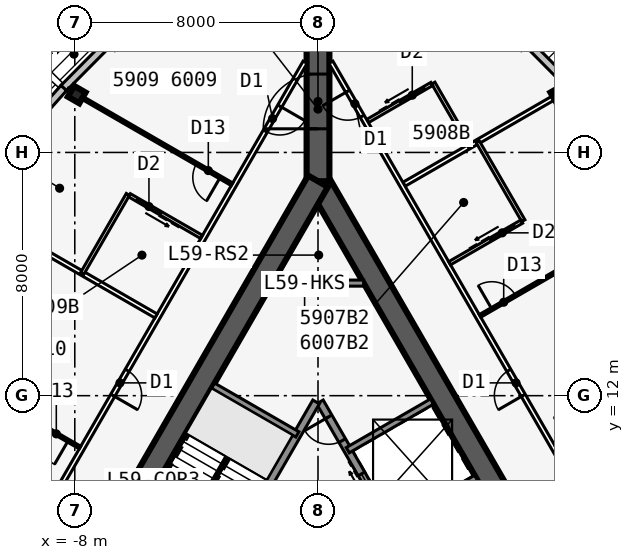
"""IFC4 building model, lengths in metres.
Left out: names, types, materials, properties, quantities, classifications, styles, units other than length and angle.
Written with IfcOpenShell. Run it as: python <this file> out.ifc"""

import sys

from ifc_helpers import new_model, si_unit, direction, frame, frame_2d, origin, origin_2d, place, context, subcontext, project, spatial, rectangle, i_section, extrude, element, fill, save


model = new_model("IFC4")
c1 = context("Model", 3, precision=1e-05, world=origin(), true_north=direction((0.0, 1.0)))
c2 = subcontext(c1, "Body", "Model", "MODEL_VIEW")
j1 = project(units=[si_unit("LENGTHUNIT", "METRE"), si_unit("PLANEANGLEUNIT", "RADIAN")], contexts=[c1])
p1 = place(None, origin())
s1 = spatial("IfcSite", under=j1, at=p1, CompositionType="ELEMENT")
p2 = place(p1, origin())
s2 = spatial("IfcBuilding", under=s1, at=p2, CompositionType="ELEMENT")
p3 = place(p2, frame((0.0, 0.0, 222.5)))
s3 = spatial("IfcBuildingStorey", under=s2, at=p3, CompositionType="ELEMENT", Elevation=222.5)
p4 = place(p3, frame((16.5, -9.526, 0.0), z_axis=(0.0, 0.0, 1.0), x_axis=(-0.499999749417, 0.866025548458, 0.0)))
e1 = element("IfcWall", 1, at=p4, inside=s3, PredefinedType="SHEAR", context=c2, shape_type="SweptSolid", body=[
    extrude(rectangle(XDim=33.0, YDim=0.75, at=frame_2d((16.5, 0.0))), origin(), (0.0, 0.0, 1.0), 3.6),
])
p5 = place(p4, frame((14.15, 0.0, 0.0)))
e2 = element("IfcOpeningElement", 2, at=p5, cuts=e1, PredefinedType="OPENING", context=c2, shape_type="SweptSolid", body=[
    extrude(rectangle(XDim=1.8, YDim=2.13, at=frame_2d((0.9, 1.065))), frame((0.0, 0.385, 0.0), z_axis=(0.0, -1.0, 0.0), x_axis=(1.0, 0.0, 0.0)), (0.0, 0.0, 1.0), 0.77),
])
p6 = place(p4, frame((12.6, 0.0, 0.0)))
e3 = element("IfcOpeningElement", 3, at=p6, cuts=e1, PredefinedType="OPENING", context=c2, shape_type="SweptSolid", body=[
    extrude(rectangle(XDim=1.0, YDim=2.13, at=frame_2d((0.5, 1.065))), frame((0.0, 0.385, 0.0), z_axis=(0.0, -1.0, 0.0), x_axis=(1.0, 0.0, 0.0)), (0.0, 0.0, 1.0), 0.77),
])
p7 = place(p3, frame((5.379, 2.586, 0.0), z_axis=(0.0, 0.0, 1.0), x_axis=(-0.500001375892, 0.866024609411, 0.0)))
e4 = element("IfcWall", 4, at=p7, inside=s3, PredefinedType="SOLIDWALL", context=c2, shape_type="SweptSolid", body=[
    extrude(rectangle(XDim=10.633, YDim=0.25, at=frame_2d((5.316, 0.0))), origin(), (0.0, 0.0, 1.0), 3.435),
])
p8 = place(p7, frame((9.164, 0.0, 0.0)))
e5 = element("IfcOpeningElement", 5, at=p8, cuts=e4, PredefinedType="OPENING", context=c2, shape_type="SweptSolid", body=[
    extrude(rectangle(XDim=0.9, YDim=2.13, at=frame_2d((0.45, 1.065))), frame((0.0, 0.135, 0.0), z_axis=(0.0, -1.0, 0.0), x_axis=(1.0, 0.0, 0.0)), (0.0, 0.0, 1.0), 0.27),
])
p9 = place(p7, frame((1.0, 0.0, 0.0)))
e6 = element("IfcOpeningElement", 6, at=p9, cuts=e4, PredefinedType="OPENING", context=c2, shape_type="SweptSolid", body=[
    extrude(rectangle(XDim=1.1, YDim=2.13, at=frame_2d((0.55, 1.065))), frame((0.0, 0.135, 0.0), z_axis=(0.0, -1.0, 0.0), x_axis=(1.0, 0.0, 0.0)), (0.0, 0.0, 1.0), 0.27),
])
p10 = place(p7, frame((3.9, 0.0, 0.0)))
e7 = element("IfcOpeningElement", 7, at=p10, cuts=e4, PredefinedType="OPENING", context=c2, shape_type="SweptSolid", body=[
    extrude(rectangle(XDim=1.1, YDim=2.13, at=frame_2d((0.55, 1.065))), frame((0.0, 0.135, 0.0), z_axis=(0.0, -1.0, 0.0), x_axis=(1.0, 0.0, 0.0)), (0.0, 0.0, 1.0), 0.27),
])
p11 = place(p7, frame((6.8, 0.0, 0.0)))
e8 = element("IfcOpeningElement", 8, at=p11, cuts=e4, PredefinedType="OPENING", context=c2, shape_type="SweptSolid", body=[
    extrude(rectangle(XDim=1.1, YDim=2.13, at=frame_2d((0.55, 1.065))), frame((0.0, 0.135, 0.0), z_axis=(0.0, -1.0, 0.0), x_axis=(1.0, 0.0, 0.0)), (0.0, 0.0, 1.0), 0.27),
])
for number, where, z_axis, x_axis in (
    (9, (2.429, 7.696, 0.0), (0.0, 0.0, 1.0), (0.866, 0.5, 0.0)),
    (10, (0.979, 10.207, 0.0), (0.0, 0.0, 1.0), (0.866, 0.5, 0.0)),
):
    element("IfcWall", number, at=place(p3, frame(where, z_axis=z_axis, x_axis=x_axis)), inside=s3, PredefinedType="SOLIDWALL", context=c2, shape_type="SweptSolid", body=[
        extrude(rectangle(XDim=3.2, YDim=0.2, at=frame_2d((1.6, 0.0))), origin(), (0.0, 0.0, 1.0), 3.435),
    ])
p12 = place(p3, frame((0.0, 19.052, 0.0), z_axis=(0.0, 0.0, 1.0), x_axis=(-0.499999749417, -0.866025548458, 0.0)))
e11 = element("IfcWall", 11, at=p12, inside=s3, PredefinedType="SHEAR", context=c2, shape_type="SweptSolid", body=[
    extrude(rectangle(XDim=33.0, YDim=0.75, at=frame_2d((16.5, 0.0))), origin(), (0.0, 0.0, 1.0), 3.6),
])
p13 = place(p12, frame((14.15, 0.0, 0.0)))
e12 = element("IfcOpeningElement", 12, at=p13, cuts=e11, PredefinedType="OPENING", context=c2, shape_type="SweptSolid", body=[
    extrude(rectangle(XDim=1.8, YDim=2.13, at=frame_2d((0.9, 1.065))), frame((0.0, 0.385, 0.0), z_axis=(0.0, -1.0, 0.0), x_axis=(1.0, 0.0, 0.0)), (0.0, 0.0, 1.0), 0.77),
])
p14 = place(p12, frame((12.6, 0.0, 0.0)))
e13 = element("IfcOpeningElement", 13, at=p14, cuts=e11, PredefinedType="OPENING", context=c2, shape_type="SweptSolid", body=[
    extrude(rectangle(XDim=1.0, YDim=2.13, at=frame_2d((0.5, 1.065))), frame((0.0, 0.385, 0.0), z_axis=(0.0, -1.0, 0.0), x_axis=(1.0, 0.0, 0.0)), (0.0, 0.0, 1.0), 0.77),
])
p15 = place(p3, frame((-0.062, 11.794, 0.0), z_axis=(0.0, 0.0, 1.0), x_axis=(-0.500006680225, -0.86602154692, 0.0)))
e14 = element("IfcWall", 14, at=p15, inside=s3, PredefinedType="SOLIDWALL", context=c2, shape_type="SweptSolid", body=[
    extrude(rectangle(XDim=7.733, YDim=0.25, at=frame_2d((3.866, 0.0))), origin(), (0.0, 0.0, 1.0), 3.435),
])
p16 = place(p3, frame((-0.679, 10.727, 0.0), z_axis=(0.0, 0.0, 1.0), x_axis=(-0.866008981251, 0.500028443584, 0.0)))
e15 = element("IfcWall", 15, at=p16, inside=s3, PredefinedType="SOLIDWALL", context=c2, shape_type="SweptSolid", body=[
    extrude(rectangle(XDim=3.2, YDim=0.2, at=frame_2d((1.6, 0.0))), origin(), (0.0, 0.0, 1.0), 3.435),
])
p17 = place(p3, frame((0.0, 19.052, 0.0), z_axis=(0.0, 0.0, 1.0), x_axis=(0.0, 1.0, 0.0)))
e16 = element("IfcWall", 16, at=p17, inside=s3, PredefinedType="SHEAR", context=c2, shape_type="SweptSolid", body=[
    extrude(rectangle(XDim=4.746, YDim=0.75, at=frame_2d((2.373, 0.0))), origin(), (0.0, 0.0, 1.0), 3.6),
])
p18 = place(p17, frame((1.725, 0.0, 0.0)))
e17 = element("IfcOpeningElement", 17, at=p18, cuts=e16, PredefinedType="OPENING", context=c2, shape_type="SweptSolid", body=[
    extrude(rectangle(XDim=1.8, YDim=2.13, at=frame_2d((0.9, 1.065))), frame((0.0, 0.385, 0.0), z_axis=(0.0, -1.0, 0.0), x_axis=(1.0, 0.0, 0.0)), (0.0, 0.0, 1.0), 0.77),
])
for number, where, z_axis, x_axis in (
    (18, (7.937, 21.903, 0.0), (0.0, 0.0, 1.0), (-0.5, 0.866, 0.0)),
    (19, (-7.937, 21.903, 0.0), (0.0, 0.0, 1.0), (-0.5, -0.866, 0.0)),
):
    element("IfcColumn", number, at=place(p3, frame(where, z_axis=z_axis, x_axis=x_axis)), inside=s3, PredefinedType="COLUMN", context=c2, shape_type="SweptSolid", body=[
        extrude(i_section(OverallWidth=0.411, OverallDepth=0.434, WebThickness=0.036, FlangeThickness=0.057, at=origin_2d()), origin(), (0.0, 0.0, 1.0), 3.6),
    ])
for number, where, z_axis, x_axis in (
    (20, (8.368, 22.115, 0.0), (0.0, 0.0, 1.0), (-0.704, 0.71, 0.0)),
    (21, (-6.911, 23.583, 0.0), (0.0, 0.0, 1.0), (-0.704, -0.71, 0.0)),
):
    element("IfcWall", number, at=place(p3, frame(where, z_axis=z_axis, x_axis=x_axis)), inside=s3, PredefinedType="STANDARD", context=c2, shape_type="SweptSolid", body=[
        extrude(rectangle(XDim=2.069, YDim=0.25, at=frame_2d((1.034, 0.0))), origin(), (0.0, 0.0, 1.0), 3.435),
    ])
p19 = place(p3, frame((-8.363, 22.12, 0.0), z_axis=(0.0, 0.0, 1.0), x_axis=(-0.664348996191, -0.747422511876, 0.0)))
e22 = element("IfcWall", 22, at=p19, inside=s3, PredefinedType="STANDARD", context=c2, shape_type="SweptSolid", body=[
    extrude(rectangle(XDim=5.105, YDim=0.25, at=frame_2d((2.552, 0.0))), origin(), (0.0, 0.0, 1.0), 3.435),
])
p20 = place(p19, frame((0.752, 0.0, 0.45)))
e23 = element("IfcOpeningElement", 23, at=p20, cuts=e22, PredefinedType="OPENING", context=c2, shape_type="SweptSolid", body=[
    extrude(rectangle(XDim=3.6, YDim=2.6, at=frame_2d((1.8, 1.3))), frame((0.0, 0.135, 0.0), z_axis=(0.0, -1.0, 0.0), x_axis=(1.0, 0.0, 0.0)), (0.0, 0.0, 1.0), 0.27),
])
p21 = place(p3, frame((20.102, -11.115, 0.0), z_axis=(0.0, 0.0, 1.0), x_axis=(-0.500000265775, 0.866025250339, 0.0)))
e24 = element("IfcWall", 24, at=p21, inside=s3, PredefinedType="PARTITIONING", context=c2, shape_type="SweptSolid", body=[
    extrude(rectangle(XDim=39.354, YDim=0.15, at=frame_2d((19.677, 0.0))), origin(), (0.0, 0.0, 1.0), 3.435),
])
p22 = place(p21, frame((1.102, 0.0, 0.0)))
e25 = element("IfcOpeningElement", 25, at=p22, cuts=e24, PredefinedType="OPENING", context=c2, shape_type="SweptSolid", body=[
    extrude(rectangle(XDim=0.95, YDim=2.13, at=frame_2d((0.475, 1.065))), frame((0.0, 0.085, 0.0), z_axis=(0.0, -1.0, 0.0), x_axis=(1.0, 0.0, 0.0)), (0.0, 0.0, 1.0), 0.17),
])
p23 = place(p21, frame((11.702, 0.0, 0.0)))
e26 = element("IfcOpeningElement", 26, at=p23, cuts=e24, PredefinedType="OPENING", context=c2, shape_type="SweptSolid", body=[
    extrude(rectangle(XDim=0.95, YDim=2.13, at=frame_2d((0.475, 1.065))), frame((0.0, 0.085, 0.0), z_axis=(0.0, -1.0, 0.0), x_axis=(1.0, 0.0, 0.0)), (0.0, 0.0, 1.0), 0.17),
])
p24 = place(p21, frame((26.702, 0.0, 0.0)))
e27 = element("IfcOpeningElement", 27, at=p24, cuts=e24, PredefinedType="OPENING", context=c2, shape_type="SweptSolid", body=[
    extrude(rectangle(XDim=0.95, YDim=2.13, at=frame_2d((0.475, 1.065))), frame((0.0, 0.085, 0.0), z_axis=(0.0, -1.0, 0.0), x_axis=(1.0, 0.0, 0.0)), (0.0, 0.0, 1.0), 0.17),
])
p25 = place(p21, frame((37.302, 0.0, 0.0)))
e28 = element("IfcOpeningElement", 28, at=p25, cuts=e24, PredefinedType="OPENING", context=c2, shape_type="SweptSolid", body=[
    extrude(rectangle(XDim=0.95, YDim=2.13, at=frame_2d((0.475, 1.065))), frame((0.0, 0.085, 0.0), z_axis=(0.0, -1.0, 0.0), x_axis=(1.0, 0.0, 0.0)), (0.0, 0.0, 1.0), 0.17),
])
p26 = place(p3, frame((5.329, 14.623, 0.0), z_axis=(0.0, 0.0, 1.0), x_axis=(0.866017877653, 0.500013035415, 0.0)))
e29 = element("IfcWall", 29, at=p26, inside=s3, PredefinedType="PARTITIONING", context=c2, shape_type="SweptSolid", body=[
    extrude(rectangle(XDim=7.273, YDim=0.1, at=frame_2d((3.636, 0.0))), origin(), (0.0, 0.0, 1.0), 2.589),
])
p27 = place(p26, frame((0.45, 0.0, 0.0)))
e30 = element("IfcOpeningElement", 30, at=p27, cuts=e29, PredefinedType="OPENING", context=c2, shape_type="SweptSolid", body=[
    extrude(rectangle(XDim=0.9, YDim=2.13, at=frame_2d((0.45, 1.065))), frame((0.0, 0.06, 0.0), z_axis=(0.0, -1.0, 0.0), x_axis=(1.0, 0.0, 0.0)), (0.0, 0.0, 1.0), 0.12),
])
p28 = place(p3, frame((2.829, 18.954, 0.0), z_axis=(0.0, 0.0, 1.0), x_axis=(0.866026604282, 0.499997920671, 0.0)))
e31 = element("IfcWall", 31, at=p28, inside=s3, PredefinedType="PARTITIONING", context=c2, shape_type="SweptSolid", body=[
    extrude(rectangle(XDim=6.24, YDim=0.15, at=frame_2d((3.12, 0.0))), origin(), (0.0, 0.0, 1.0), 2.589),
])
p29 = place(p3, frame((6.753, 17.755, 0.0), z_axis=(0.0, 0.0, 1.0), x_axis=(-0.499990139034, 0.866031096941, 0.0)))
e32 = element("IfcWall", 32, at=p29, inside=s3, PredefinedType="PLUMBINGWALL", context=c2, shape_type="SweptSolid", body=[
    extrude(rectangle(XDim=3.0, YDim=0.12, at=frame_2d((1.5, 0.0))), origin(), (0.0, 0.0, 1.0), 3.435),
])
p30 = place(p3, frame((4.329, 16.355, 0.0), z_axis=(0.0, 0.0, 1.0), x_axis=(0.866035715982, 0.499982138324, 0.0)))
e33 = element("IfcWall", 33, at=p30, inside=s3, PredefinedType="PLUMBINGWALL", context=c2, shape_type="SweptSolid", body=[
    extrude(rectangle(XDim=2.74, YDim=0.12, at=frame_2d((1.37, 0.0))), origin(), (0.0, 0.0, 1.0), 3.435),
])
p31 = place(p30, frame((1.55, 0.0, 0.0)))
e34 = element("IfcOpeningElement", 34, at=p31, cuts=e33, PredefinedType="OPENING", context=c2, shape_type="SweptSolid", body=[
    extrude(rectangle(XDim=0.9, YDim=2.13, at=frame_2d((0.45, 1.065))), frame((0.0, 0.07, 0.0), z_axis=(0.0, -1.0, 0.0), x_axis=(1.0, 0.0, 0.0)), (0.0, 0.0, 1.0), 0.14),
])
p32 = place(p3, frame((4.993, 20.204, 0.0), z_axis=(0.0, 0.0, 1.0), x_axis=(-0.500001309137, 0.866024647952, 0.0)))
e35 = element("IfcWall", 35, at=p32, inside=s3, PredefinedType="PLUMBINGWALL", context=c2, shape_type="SweptSolid", body=[
    extrude(rectangle(XDim=2.4, YDim=0.12, at=frame_2d((1.2, 0.0))), origin(), (0.0, 0.0, 1.0), 3.435),
])
p33 = place(p3, frame((1.628, 21.032, 0.0), z_axis=(0.0, 0.0, 1.0), x_axis=(0.866048967903, 0.499959183527, 0.0)))
e36 = element("IfcWall", 36, at=p33, inside=s3, PredefinedType="PLUMBINGWALL", context=c2, shape_type="SweptSolid", body=[
    extrude(rectangle(XDim=2.44, YDim=0.12, at=frame_2d((1.22, 0.0))), origin(), (0.0, 0.0, 1.0), 3.435),
])
p34 = place(p33, frame((1.25, 0.0, 0.0)))
e37 = element("IfcOpeningElement", 37, at=p34, cuts=e36, PredefinedType="OPENING", context=c2, shape_type="SweptSolid", body=[
    extrude(rectangle(XDim=0.9, YDim=2.13, at=frame_2d((0.45, 1.065))), frame((0.0, 0.07, 0.0), z_axis=(0.0, -1.0, 0.0), x_axis=(1.0, 0.0, 0.0)), (0.0, 0.0, 1.0), 0.14),
])
p35 = place(p3, frame((-0.425, 22.966, 0.0), z_axis=(0.0, 0.0, 1.0), x_axis=(-0.500000265775, -0.866025250339, 0.0)))
e38 = element("IfcWall", 38, at=p35, inside=s3, PredefinedType="PARTITIONING", context=c2, shape_type="SweptSolid", body=[
    extrude(rectangle(XDim=39.354, YDim=0.15, at=frame_2d((19.677, 0.0))), origin(), (0.0, 0.0, 1.0), 3.435),
])
p36 = place(p35, frame((1.665, 0.0, 0.0)))
e39 = element("IfcOpeningElement", 39, at=p36, cuts=e38, PredefinedType="OPENING", context=c2, shape_type="SweptSolid", body=[
    extrude(rectangle(XDim=0.95, YDim=2.13, at=frame_2d((0.475, 1.065))), frame((0.0, 0.085, 0.0), z_axis=(0.0, -1.0, 0.0), x_axis=(1.0, 0.0, 0.0)), (0.0, 0.0, 1.0), 0.17),
])
p37 = place(p35, frame((11.702, 0.0, 0.0)))
e40 = element("IfcOpeningElement", 40, at=p37, cuts=e38, PredefinedType="OPENING", context=c2, shape_type="SweptSolid", body=[
    extrude(rectangle(XDim=0.95, YDim=2.13, at=frame_2d((0.475, 1.065))), frame((0.0, 0.085, 0.0), z_axis=(0.0, -1.0, 0.0), x_axis=(1.0, 0.0, 0.0)), (0.0, 0.0, 1.0), 0.17),
])
p38 = place(p35, frame((21.702, 0.0, 0.0)))
e41 = element("IfcOpeningElement", 41, at=p38, cuts=e38, PredefinedType="OPENING", context=c2, shape_type="SweptSolid", body=[
    extrude(rectangle(XDim=0.95, YDim=2.13, at=frame_2d((0.475, 1.065))), frame((0.0, 0.085, 0.0), z_axis=(0.0, -1.0, 0.0), x_axis=(1.0, 0.0, 0.0)), (0.0, 0.0, 1.0), 0.17),
])
p39 = place(p35, frame((36.739, 0.0, 0.0)))
e42 = element("IfcOpeningElement", 42, at=p39, cuts=e38, PredefinedType="OPENING", context=c2, shape_type="SweptSolid", body=[
    extrude(rectangle(XDim=0.95, YDim=2.13, at=frame_2d((0.475, 1.065))), frame((0.0, 0.085, 0.0), z_axis=(0.0, -1.0, 0.0), x_axis=(1.0, 0.0, 0.0)), (0.0, 0.0, 1.0), 0.17),
])
p40 = place(p3, frame((-2.829, 18.954, 0.0), z_axis=(0.0, 0.0, 1.0), x_axis=(-0.866026604282, 0.499997920671, 0.0)))
e43 = element("IfcWall", 43, at=p40, inside=s3, PredefinedType="PARTITIONING", context=c2, shape_type="SweptSolid", body=[
    extrude(rectangle(XDim=6.24, YDim=0.1, at=frame_2d((3.12, 0.0))), origin(), (0.0, 0.0, 1.0), 2.589),
])
p41 = place(p40, frame((0.45, 0.0, 0.0)))
e44 = element("IfcOpeningElement", 44, at=p41, cuts=e43, PredefinedType="OPENING", context=c2, shape_type="SweptSolid", body=[
    extrude(rectangle(XDim=0.9, YDim=2.13, at=frame_2d((0.45, 1.065))), frame((0.0, 0.06, 0.0), z_axis=(0.0, -1.0, 0.0), x_axis=(1.0, 0.0, 0.0)), (0.0, 0.0, 1.0), 0.12),
])
p42 = place(p3, frame((-5.329, 14.623, 0.0), z_axis=(0.0, 0.0, 1.0), x_axis=(-0.866017877653, 0.500013035415, 0.0)))
e45 = element("IfcWall", 45, at=p42, inside=s3, PredefinedType="PARTITIONING", context=c2, shape_type="SweptSolid", body=[
    extrude(rectangle(XDim=7.273, YDim=0.15, at=frame_2d((3.636, 0.0))), origin(), (0.0, 0.0, 1.0), 2.589),
])
p43 = place(p3, frame((-7.829, 10.293, 0.0), z_axis=(0.0, 0.0, 1.0), x_axis=(-0.866030558329, 0.49999107196, 0.0)))
e46 = element("IfcWall", 46, at=p43, inside=s3, PredefinedType="PARTITIONING", context=c2, shape_type="SweptSolid", body=[
    extrude(rectangle(XDim=7.894, YDim=0.1, at=frame_2d((3.947, 0.0))), origin(), (0.0, 0.0, 1.0), 2.589),
])
p44 = place(p43, frame((0.45, 0.0, 0.0)))
e47 = element("IfcOpeningElement", 47, at=p44, cuts=e46, PredefinedType="OPENING", context=c2, shape_type="SweptSolid", body=[
    extrude(rectangle(XDim=0.9, YDim=2.13, at=frame_2d((0.45, 1.065))), frame((0.0, 0.06, 0.0), z_axis=(0.0, -1.0, 0.0), x_axis=(1.0, 0.0, 0.0)), (0.0, 0.0, 1.0), 0.12),
])
p45 = place(p3, frame((-6.253, 18.622, 0.0), z_axis=(0.0, 0.0, 1.0), x_axis=(-0.499990139034, -0.866031096941, 0.0)))
e48 = element("IfcWall", 48, at=p45, inside=s3, PredefinedType="PLUMBINGWALL", context=c2, shape_type="SweptSolid", body=[
    extrude(rectangle(XDim=3.0, YDim=0.12, at=frame_2d((1.5, 0.0))), origin(), (0.0, 0.0, 1.0), 3.435),
])
p46 = place(p3, frame((-3.829, 17.221, 0.0), z_axis=(0.0, 0.0, 1.0), x_axis=(-0.865997131366, 0.500048966069, 0.0)))
e49 = element("IfcWall", 49, at=p46, inside=s3, PredefinedType="PLUMBINGWALL", context=c2, shape_type="SweptSolid", body=[
    extrude(rectangle(XDim=2.74, YDim=0.12, at=frame_2d((1.37, 0.0))), origin(), (0.0, 0.0, 1.0), 3.435),
])
p47 = place(p46, frame((1.55, 0.0, 0.0)))
e50 = element("IfcOpeningElement", 50, at=p47, cuts=e49, PredefinedType="OPENING", context=c2, shape_type="SweptSolid", body=[
    extrude(rectangle(XDim=0.9, YDim=2.13, at=frame_2d((0.45, 1.065))), frame((0.0, 0.07, 0.0), z_axis=(0.0, -1.0, 0.0), x_axis=(1.0, 0.0, 0.0)), (0.0, 0.0, 1.0), 0.14),
])
p48 = place(p3, frame((-1.501, 15.703, 0.0), z_axis=(0.0, 0.0, 1.0), x_axis=(1.0, 0.0, 0.0)))
e51 = element("IfcWall", 51, at=p48, inside=s3, PredefinedType="SOLIDWALL", context=c2, shape_type="SweptSolid", body=[
    extrude(rectangle(XDim=3.002, YDim=0.2, at=frame_2d((1.501, 0.0))), origin(), (0.0, 0.0, 1.0), 3.435),
])
p49 = place(p3, frame((-2.988, 9.978, 0.0), z_axis=(0.0, 0.0, 1.0), x_axis=(-0.499992232847, -0.866029888106, 0.0)))
e52 = element("IfcWall", 52, at=p49, inside=s3, PredefinedType="SOLIDWALL", context=c2, shape_type="SweptSolid", body=[
    extrude(rectangle(XDim=2.794, YDim=0.1, at=frame_2d((1.397, 0.0))), origin(), (0.0, 0.0, 1.0), 3.6),
])
p50 = place(p27, origin())
e53 = element("IfcDoor", 53, at=p50, inside=s3, OperationType="SINGLE_SWING_LEFT", PredefinedType="DOOR", context=c2, shape_type="SweptSolid", body=[
    extrude(rectangle(XDim=0.9, YDim=2.13, at=frame_2d((0.45, 1.065))), frame((0.0, 0.025, 0.0), z_axis=(0.0, -1.0, 0.0), x_axis=(1.0, 0.0, 0.0)), (0.0, 0.0, 1.0), 0.05),
])
fill(e30, e53)
p51 = place(p24, origin())
e54 = element("IfcDoor", 54, at=p51, inside=s3, OperationType="SINGLE_SWING_LEFT", PredefinedType="DOOR", context=c2, shape_type="SweptSolid", body=[
    extrude(rectangle(XDim=0.95, YDim=2.13, at=frame_2d((0.475, 1.065))), frame((0.0, 0.025, 0.0), z_axis=(0.0, -1.0, 0.0), x_axis=(1.0, 0.0, 0.0)), (0.0, 0.0, 1.0), 0.05),
])
fill(e27, e54)
p52 = place(p31, origin())
e55 = element("IfcDoor", 55, at=p52, inside=s3, OperationType="SLIDING_TO_LEFT", PredefinedType="DOOR", context=c2, shape_type="SweptSolid", body=[
    extrude(rectangle(XDim=0.9, YDim=2.13, at=frame_2d((0.45, 1.065))), frame((0.0, 0.025, 0.0), z_axis=(0.0, -1.0, 0.0), x_axis=(1.0, 0.0, 0.0)), (0.0, 0.0, 1.0), 0.05),
])
fill(e34, e55)
p53 = place(p34, origin())
e56 = element("IfcDoor", 56, at=p53, inside=s3, OperationType="SLIDING_TO_LEFT", PredefinedType="DOOR", context=c2, shape_type="SweptSolid", body=[
    extrude(rectangle(XDim=0.9, YDim=2.13, at=frame_2d((0.45, 1.065))), frame((0.0, 0.025, 0.0), z_axis=(0.0, -1.0, 0.0), x_axis=(1.0, 0.0, 0.0)), (0.0, 0.0, 1.0), 0.05),
])
fill(e37, e56)
p54 = place(p25, origin())
e57 = element("IfcDoor", 57, at=p54, inside=s3, OperationType="SINGLE_SWING_RIGHT", PredefinedType="DOOR", context=c2, shape_type="SweptSolid", body=[
    extrude(rectangle(XDim=0.95, YDim=2.13, at=frame_2d((0.475, 1.065))), frame((0.0, 0.025, 0.0), z_axis=(0.0, -1.0, 0.0), x_axis=(1.0, 0.0, 0.0)), (0.0, 0.0, 1.0), 0.05),
])
fill(e28, e57)
p55 = place(p41, origin())
e58 = element("IfcDoor", 58, at=p55, inside=s3, OperationType="SINGLE_SWING_LEFT", PredefinedType="DOOR", context=c2, shape_type="SweptSolid", body=[
    extrude(rectangle(XDim=0.9, YDim=2.13, at=frame_2d((0.45, 1.065))), frame((0.0, 0.025, 0.0), z_axis=(0.0, -1.0, 0.0), x_axis=(1.0, 0.0, 0.0)), (0.0, 0.0, 1.0), 0.05),
])
fill(e44, e58)
p56 = place(p44, origin())
e59 = element("IfcDoor", 59, at=p56, inside=s3, OperationType="SINGLE_SWING_LEFT", PredefinedType="DOOR", context=c2, shape_type="SweptSolid", body=[
    extrude(rectangle(XDim=0.9, YDim=2.13, at=frame_2d((0.45, 1.065))), frame((0.0, 0.025, 0.0), z_axis=(0.0, -1.0, 0.0), x_axis=(1.0, 0.0, 0.0)), (0.0, 0.0, 1.0), 0.05),
])
fill(e47, e59)
p57 = place(p36, origin())
e60 = element("IfcDoor", 60, at=p57, inside=s3, OperationType="SINGLE_SWING_LEFT", PredefinedType="DOOR", context=c2, shape_type="SweptSolid", body=[
    extrude(rectangle(XDim=0.95, YDim=2.13, at=frame_2d((0.475, 1.065))), frame((0.0, 0.025, 0.0), z_axis=(0.0, -1.0, 0.0), x_axis=(1.0, 0.0, 0.0)), (0.0, 0.0, 1.0), 0.05),
])
fill(e39, e60)
p58 = place(p47, origin())
e61 = element("IfcDoor", 61, at=p58, inside=s3, OperationType="SLIDING_TO_LEFT", PredefinedType="DOOR", context=c2, shape_type="SweptSolid", body=[
    extrude(rectangle(XDim=0.9, YDim=2.13, at=frame_2d((0.45, 1.065))), frame((0.0, 0.025, 0.0), z_axis=(0.0, -1.0, 0.0), x_axis=(1.0, 0.0, 0.0)), (0.0, 0.0, 1.0), 0.05),
])
fill(e50, e61)
p59 = place(p37, origin())
e62 = element("IfcDoor", 62, at=p59, inside=s3, OperationType="SINGLE_SWING_RIGHT", PredefinedType="DOOR", context=c2, shape_type="SweptSolid", body=[
    extrude(rectangle(XDim=0.95, YDim=2.13, at=frame_2d((0.475, 1.065))), frame((0.0, 0.025, 0.0), z_axis=(0.0, -1.0, 0.0), x_axis=(1.0, 0.0, 0.0)), (0.0, 0.0, 1.0), 0.05),
])
fill(e40, e62)
p60 = place(p18, origin())
e63 = element("IfcDoor", 63, at=p60, inside=s3, OperationType="DOUBLE_DOOR_DOUBLE_SWING", PredefinedType="DOOR", context=c2, shape_type="SweptSolid", body=[
    extrude(rectangle(XDim=1.8, YDim=2.13, at=frame_2d((0.9, 1.065))), frame((0.0, 0.025, 0.0), z_axis=(0.0, -1.0, 0.0), x_axis=(1.0, 0.0, 0.0)), (0.0, 0.0, 1.0), 0.05),
])
fill(e17, e63)
p61 = place(p8, origin())
e64 = element("IfcDoor", 64, at=p61, inside=s3, OperationType="SINGLE_SWING_RIGHT", PredefinedType="DOOR", context=c2, shape_type="SweptSolid", body=[
    extrude(rectangle(XDim=0.9, YDim=2.13, at=frame_2d((0.45, 1.065))), frame((0.0, 0.025, 0.0), z_axis=(0.0, -1.0, 0.0), x_axis=(1.0, 0.0, 0.0)), (0.0, 0.0, 1.0), 0.05),
])
fill(e5, e64)
p62 = place(p11, origin())
e65 = element("IfcDoor", 65, at=p62, inside=s3, OperationType="DOUBLE_DOOR_SLIDING", PredefinedType="USERDEFINED", context=c2, shape_type="SweptSolid", body=[
    extrude(rectangle(XDim=1.1, YDim=2.13, at=frame_2d((0.55, 1.065))), frame((0.0, 0.025, 0.0), z_axis=(0.0, -1.0, 0.0), x_axis=(1.0, 0.0, 0.0)), (0.0, 0.0, 1.0), 0.05),
])
fill(e8, e65)
save(model, sys.argv[1])
